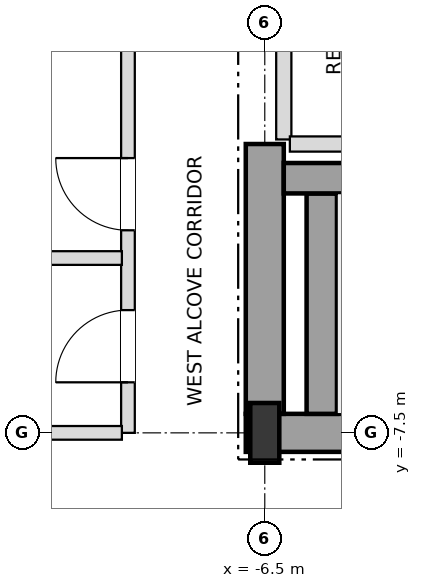
"""IFC4 building model, lengths in metres.
Left out: names, types, materials, properties, quantities, classifications, styles, units other than length and angle.
Written with IfcOpenShell. Run it as: python <this file> out.ifc"""

import sys

from ifc_helpers import new_model, si_unit, direction, frame, frame_2d, origin, origin_2d, place, context, subcontext, project, spatial, rectangle, i_section, extrude, element, fill, save


model = new_model("IFC4")
c1 = context("Model", 3, precision=1e-05, world=origin(), true_north=direction((0.0, 1.0)))
c2 = subcontext(c1, "Body", "Model", "MODEL_VIEW")
j1 = project(units=[si_unit("LENGTHUNIT", "METRE"), si_unit("PLANEANGLEUNIT", "RADIAN")], contexts=[c1])
p1 = place(None, origin())
s1 = spatial("IfcSite", under=j1, at=p1, CompositionType="ELEMENT")
p2 = place(p1, origin())
s2 = spatial("IfcBuilding", under=s1, at=p2, CompositionType="ELEMENT")
p3 = place(p2, frame((0.0, 0.0, 208.8)))
s3 = spatial("IfcBuildingStorey", under=s2, at=p3, CompositionType="ELEMENT", Elevation=208.8)
p4 = place(p3, frame((-6.5, -7.5, 0.0), z_axis=(0.0, 0.0, 1.0), x_axis=(1.0, 0.0, 0.0)))
e1 = element("IfcColumn", 1, at=p4, inside=s3, PredefinedType="COLUMN", context=c2, shape_type="SweptSolid", body=[
    extrude(i_section(OverallWidth=0.382, OverallDepth=0.786, WebThickness=0.02, FlangeThickness=0.033, at=origin_2d()), origin(), (0.0, 0.0, 1.0), 3.6),
])
p5 = place(p3, frame((-6.75, -7.5, 0.0), z_axis=(0.0, 0.0, 1.0), x_axis=(1.0, 0.0, 0.0)))
e2 = element("IfcWall", 2, at=p5, inside=s3, PredefinedType="SHEAR", context=c2, shape_type="SweptSolid", body=[
    extrude(rectangle(XDim=6.75, YDim=0.5, at=frame_2d((3.375, 0.0))), origin(), (0.0, 0.0, 1.0), 3.3),
])
p6 = place(p3, frame((-6.5, -7.25, 0.0), z_axis=(0.0, 0.0, 1.0), x_axis=(0.0, 1.0, 0.0)))
e3 = element("IfcWall", 3, at=p6, inside=s3, PredefinedType="SHEAR", context=c2, shape_type="SweptSolid", body=[
    extrude(rectangle(XDim=3.55, YDim=0.5, at=frame_2d((1.775, 0.0))), origin(), (0.0, 0.0, 1.0), 3.3),
])
p7 = place(p3, frame((-5.75, -7.25, 0.0), z_axis=(0.0, 0.0, 1.0), x_axis=(0.0, 1.0, 0.0)))
e4 = element("IfcWall", 4, at=p7, inside=s3, PredefinedType="SHEAR", context=c2, shape_type="SweptSolid", body=[
    extrude(rectangle(XDim=2.9, YDim=0.4, at=frame_2d((1.45, 0.0))), origin(), (0.0, 0.0, 1.0), 3.3),
])
p8 = place(p3, frame((-6.25, -4.15, 0.0), z_axis=(0.0, 0.0, 1.0), x_axis=(1.0, 0.0, 0.0)))
e5 = element("IfcWall", 5, at=p8, inside=s3, PredefinedType="SHEAR", context=c2, shape_type="SweptSolid", body=[
    extrude(rectangle(XDim=7.78, YDim=0.4, at=frame_2d((3.89, 0.0))), origin(), (0.0, 0.0, 1.0), 3.3),
])
p9 = place(p3, frame((-8.3, -7.5, 0.0), z_axis=(0.0, 0.0, 1.0), x_axis=(0.0, 1.0, 0.0)))
e6 = element("IfcWall", 6, at=p9, inside=s3, PredefinedType="PARTITIONING", context=c2, shape_type="SweptSolid", body=[
    extrude(rectangle(XDim=15.0, YDim=0.18, at=frame_2d((7.5, 0.0))), origin(), (0.0, 0.0, 1.0), 3.3),
])
p10 = place(p9, frame((0.665, 0.0, 0.0)))
e7 = element("IfcOpeningElement", 7, at=p10, cuts=e6, PredefinedType="OPENING", context=c2, shape_type="SweptSolid", body=[
    extrude(rectangle(XDim=0.95, YDim=2.15, at=frame_2d((0.475, 1.075))), frame((0.0, 0.1, 0.0), z_axis=(0.0, -1.0, 0.0), x_axis=(1.0, 0.0, 0.0)), (0.0, 0.0, 1.0), 0.2),
])
p11 = place(p9, frame((2.665, 0.0, 0.0)))
e8 = element("IfcOpeningElement", 8, at=p11, cuts=e6, PredefinedType="OPENING", context=c2, shape_type="SweptSolid", body=[
    extrude(rectangle(XDim=0.95, YDim=2.15, at=frame_2d((0.475, 1.075))), frame((0.0, 0.1, 0.0), z_axis=(0.0, -1.0, 0.0), x_axis=(1.0, 0.0, 0.0)), (0.0, 0.0, 1.0), 0.2),
])
p12 = place(p3, frame((-6.25, -3.64, 0.0), z_axis=(0.0, 0.0, 1.0), x_axis=(0.0, 1.0, 0.0)))
e9 = element("IfcWall", 9, at=p12, inside=s3, PredefinedType="SOLIDWALL", context=c2, shape_type="SweptSolid", body=[
    extrude(rectangle(XDim=7.34, YDim=0.2, at=frame_2d((3.67, 0.0))), origin(), (0.0, 0.0, 1.0), 3.3),
])
p13 = place(p3, frame((-18.4, -7.5, 0.0), z_axis=(0.0, 0.0, 1.0), x_axis=(1.0, 0.0, 0.0)))
e10 = element("IfcWall", 10, at=p13, inside=s3, PredefinedType="PARTITIONING", context=c2, shape_type="SweptSolid", body=[
    extrude(rectangle(XDim=10.02, YDim=0.18, at=frame_2d((5.01, 0.0))), origin(), (0.0, 0.0, 1.0), 2.746),
])
p14 = place(p3, frame((-18.32, -5.2, 0.0), z_axis=(0.0, 0.0, 1.0), x_axis=(1.0, 0.0, 0.0)))
e11 = element("IfcWall", 11, at=p14, inside=s3, PredefinedType="PARTITIONING", context=c2, shape_type="SweptSolid", body=[
    extrude(rectangle(XDim=9.94, YDim=0.18, at=frame_2d((4.97, 0.0))), origin(), (0.0, 0.0, 1.0), 2.746),
])
p15 = place(p3, frame((-6.17, -3.7, 0.0), z_axis=(0.0, 0.0, 1.0), x_axis=(1.0, 0.0, 0.0)))
e12 = element("IfcWall", 12, at=p15, inside=s3, PredefinedType="SOLIDWALL", context=c2, shape_type="SweptSolid", body=[
    extrude(rectangle(XDim=1.94, YDim=0.2, at=frame_2d((0.97, 0.0))), origin(), (0.0, 0.0, 1.0), 3.3),
])
p16 = place(p10, origin())
e13 = element("IfcDoor", 13, at=p16, inside=s3, OperationType="SINGLE_SWING_LEFT", PredefinedType="DOOR", context=c2, shape_type="SweptSolid", body=[
    extrude(rectangle(XDim=0.95, YDim=2.15, at=frame_2d((0.475, 1.075))), frame((0.0, 0.025, 0.0), z_axis=(0.0, -1.0, 0.0), x_axis=(1.0, 0.0, 0.0)), (0.0, 0.0, 1.0), 0.05),
])
fill(e7, e13)
p17 = place(p11, origin())
e14 = element("IfcDoor", 14, at=p17, inside=s3, OperationType="SINGLE_SWING_RIGHT", PredefinedType="DOOR", context=c2, shape_type="SweptSolid", body=[
    extrude(rectangle(XDim=0.95, YDim=2.15, at=frame_2d((0.475, 1.075))), frame((0.0, 0.025, 0.0), z_axis=(0.0, -1.0, 0.0), x_axis=(1.0, 0.0, 0.0)), (0.0, 0.0, 1.0), 0.05),
])
fill(e8, e14)
save(model, sys.argv[1])
